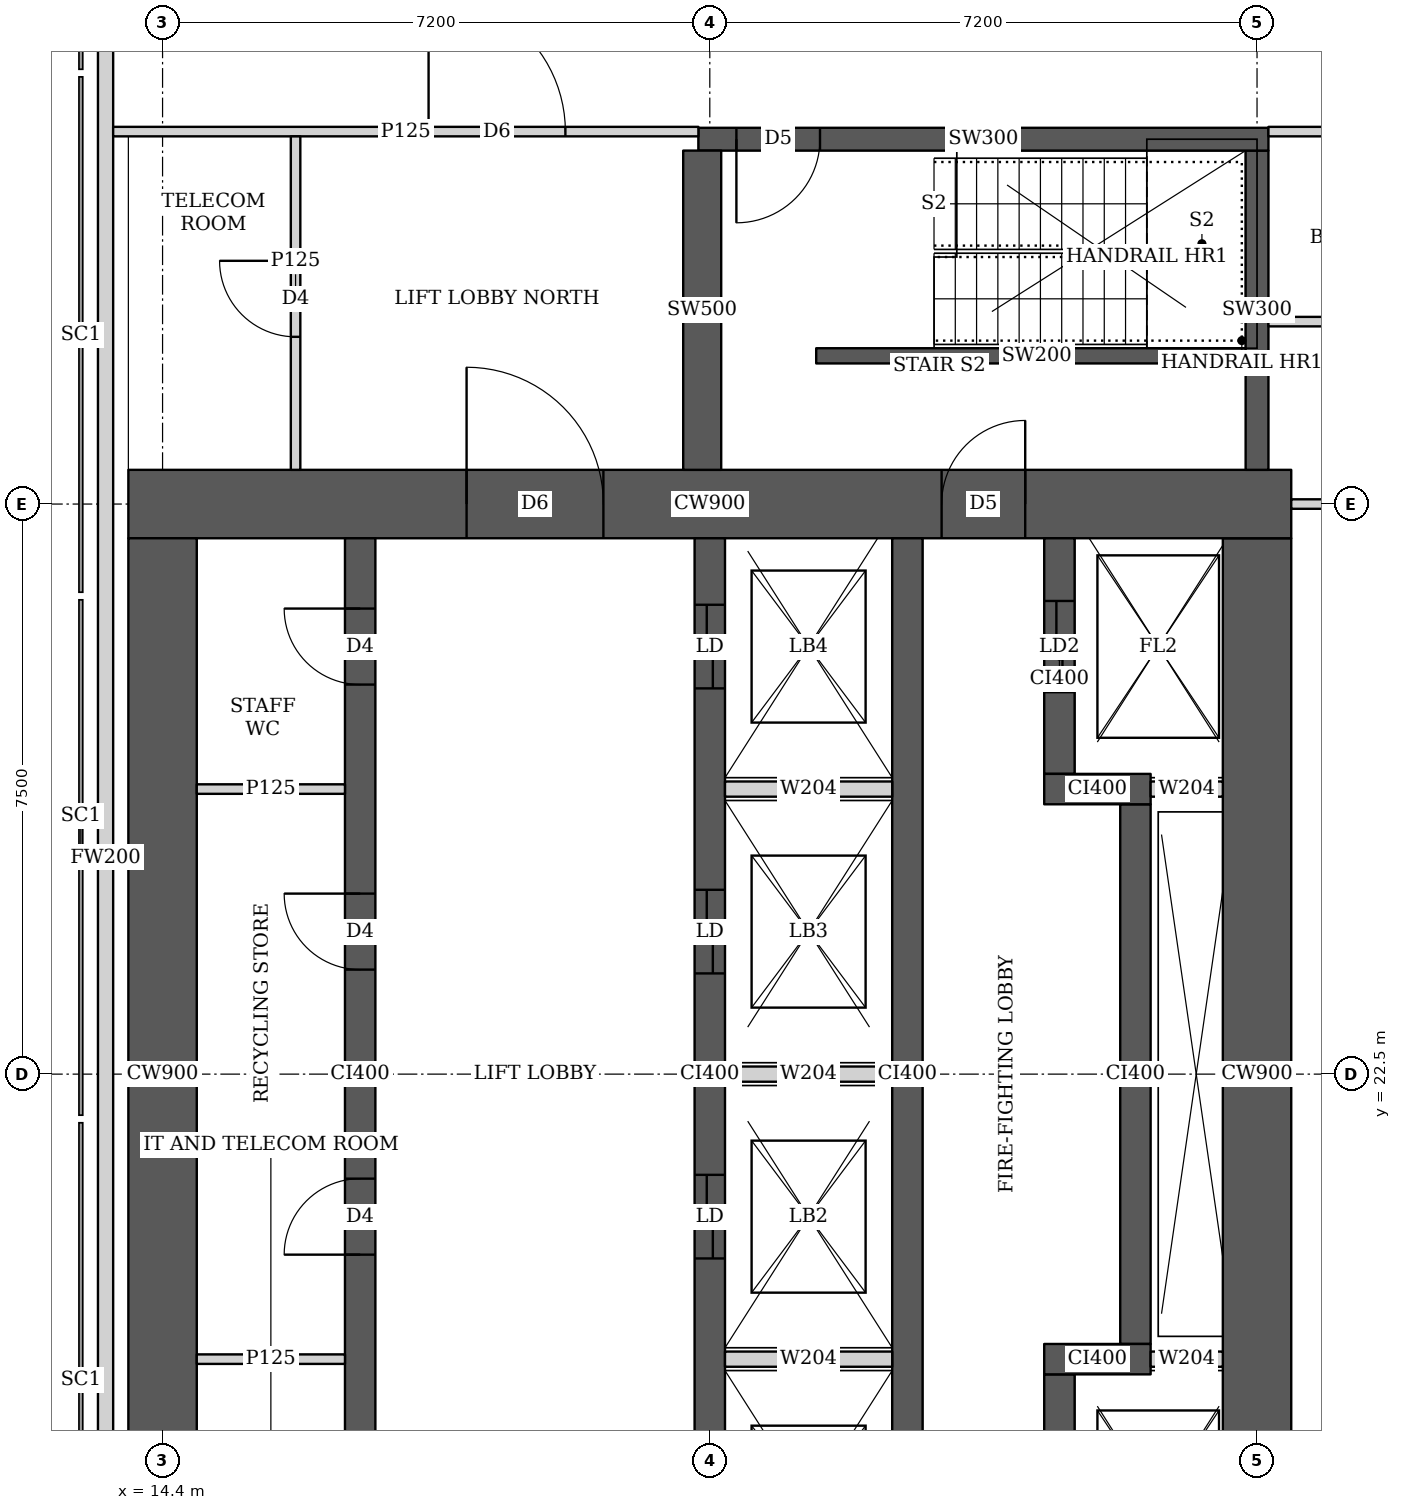
"""IFC4 building model, lengths in metres.
Left out: names, types, materials, properties, quantities, classifications, styles, units other than length and angle.
Written with IfcOpenShell. Run it as: python <this file> out.ifc"""

import sys

from ifc_helpers import new_model, si_unit, direction, frame, frame_2d, origin, place, context, subcontext, project, spatial, rectangle, extrude, element, fill, save


model = new_model("IFC4")
c1 = context("Model", 3, precision=1e-05, world=origin(), true_north=direction((0.0, 1.0)))
c2 = subcontext(c1, "Body", "Model", "MODEL_VIEW")
j1 = project(units=[si_unit("LENGTHUNIT", "METRE"), si_unit("PLANEANGLEUNIT", "RADIAN")], contexts=[c1])
p1 = place(None, origin())
s1 = spatial("IfcSite", under=j1, at=p1, CompositionType="ELEMENT")
p2 = place(p1, origin())
s2 = spatial("IfcBuilding", under=s1, at=p2, CompositionType="ELEMENT")
p3 = place(p2, frame((0.0, 0.0, 292.85)))
s3 = spatial("IfcBuildingStorey", under=s2, at=p3, CompositionType="ELEMENT", Elevation=292.85)
p4 = place(p3, frame((13.95, 30.0, 0.0), z_axis=(0.0, 0.0, 1.0), x_axis=(1.0, 0.0, 0.0)))
e1 = element("IfcWall", 1, at=p4, inside=s3, PredefinedType="SHEAR", context=c2, shape_type="SweptSolid", body=[
    extrude(rectangle(XDim=15.3, YDim=0.9, at=frame_2d((7.65, 0.0))), origin(), (0.0, 0.0, 1.0), 3.75),
])
p5 = place(p4, frame((4.45, 0.0, 0.0)))
e2 = element("IfcOpeningElement", 2, at=p5, cuts=e1, PredefinedType="OPENING", context=c2, shape_type="SweptSolid", body=[
    extrude(rectangle(XDim=1.8, YDim=2.1, at=frame_2d((0.9, 1.05))), frame((0.0, 0.46, 0.0), z_axis=(0.0, -1.0, 0.0), x_axis=(1.0, 0.0, 0.0)), (0.0, 0.0, 1.0), 0.92),
])
p6 = place(p4, frame((10.7, 0.0, 0.0)))
e3 = element("IfcOpeningElement", 3, at=p6, cuts=e1, PredefinedType="OPENING", context=c2, shape_type="SweptSolid", body=[
    extrude(rectangle(XDim=1.1, YDim=2.1, at=frame_2d((0.55, 1.05))), frame((0.0, 0.46, 0.0), z_axis=(0.0, -1.0, 0.0), x_axis=(1.0, 0.0, 0.0)), (0.0, 0.0, 1.0), 0.92),
])
for number, where, z_axis, x_axis in (
    (4, (14.4, 15.45, 0.0), (0.0, 0.0, 1.0), (0.0, 1.0, 0.0)),
    (5, (28.8, 15.45, 0.0), (0.0, 0.0, 1.0), (0.0, 1.0, 0.0)),
):
    element("IfcWall", number, at=place(p3, frame(where, z_axis=z_axis, x_axis=x_axis)), inside=s3, PredefinedType="SHEAR", context=c2, shape_type="SweptSolid", body=[
        extrude(rectangle(XDim=14.1, YDim=0.9, at=frame_2d((7.05, 0.0))), origin(), (0.0, 0.0, 1.0), 3.75),
    ])
p7 = place(p3, frame((17.0, 15.45, 0.0), z_axis=(0.0, 0.0, 1.0), x_axis=(0.0, 1.0, 0.0)))
e6 = element("IfcWall", 6, at=p7, inside=s3, PredefinedType="SHEAR", context=c2, shape_type="SweptSolid", body=[
    extrude(rectangle(XDim=14.1, YDim=0.4, at=frame_2d((7.05, 0.0))), origin(), (0.0, 0.0, 1.0), 3.75),
])
p8 = place(p7, frame((1.05, 0.0, 0.0)))
e7 = element("IfcOpeningElement", 7, at=p8, cuts=e6, PredefinedType="OPENING", context=c2, shape_type="SweptSolid", body=[
    extrude(rectangle(XDim=1.0, YDim=2.1, at=frame_2d((0.5, 1.05))), frame((0.0, 0.21, 0.0), z_axis=(0.0, -1.0, 0.0), x_axis=(1.0, 0.0, 0.0)), (0.0, 0.0, 1.0), 0.42),
])
p9 = place(p7, frame((4.675, 0.0, 0.0)))
e8 = element("IfcOpeningElement", 8, at=p9, cuts=e6, PredefinedType="OPENING", context=c2, shape_type="SweptSolid", body=[
    extrude(rectangle(XDim=1.0, YDim=2.1, at=frame_2d((0.5, 1.05))), frame((0.0, 0.21, 0.0), z_axis=(0.0, -1.0, 0.0), x_axis=(1.0, 0.0, 0.0)), (0.0, 0.0, 1.0), 0.42),
])
p10 = place(p7, frame((8.425, 0.0, 0.0)))
e9 = element("IfcOpeningElement", 9, at=p10, cuts=e6, PredefinedType="OPENING", context=c2, shape_type="SweptSolid", body=[
    extrude(rectangle(XDim=1.0, YDim=2.1, at=frame_2d((0.5, 1.05))), frame((0.0, 0.21, 0.0), z_axis=(0.0, -1.0, 0.0), x_axis=(1.0, 0.0, 0.0)), (0.0, 0.0, 1.0), 0.42),
])
p11 = place(p7, frame((12.175, 0.0, 0.0)))
e10 = element("IfcOpeningElement", 10, at=p11, cuts=e6, PredefinedType="OPENING", context=c2, shape_type="SweptSolid", body=[
    extrude(rectangle(XDim=1.0, YDim=2.1, at=frame_2d((0.5, 1.05))), frame((0.0, 0.21, 0.0), z_axis=(0.0, -1.0, 0.0), x_axis=(1.0, 0.0, 0.0)), (0.0, 0.0, 1.0), 0.42),
])
p12 = place(p3, frame((21.6, 15.45, 0.0), z_axis=(0.0, 0.0, 1.0), x_axis=(0.0, 1.0, 0.0)))
e11 = element("IfcWall", 11, at=p12, inside=s3, PredefinedType="SHEAR", context=c2, shape_type="SweptSolid", body=[
    extrude(rectangle(XDim=14.1, YDim=0.4, at=frame_2d((7.05, 0.0))), origin(), (0.0, 0.0, 1.0), 3.75),
])
p13 = place(p12, frame((0.875, 0.0, 0.0)))
e12 = element("IfcOpeningElement", 12, at=p13, cuts=e11, PredefinedType="OPENING", context=c2, shape_type="SweptSolid", body=[
    extrude(rectangle(XDim=1.1, YDim=2.1, at=frame_2d((0.55, 1.05))), frame((0.0, 0.21, 0.0), z_axis=(0.0, -1.0, 0.0), x_axis=(1.0, 0.0, 0.0)), (0.0, 0.0, 1.0), 0.42),
])
p14 = place(p12, frame((4.625, 0.0, 0.0)))
e13 = element("IfcOpeningElement", 13, at=p14, cuts=e11, PredefinedType="OPENING", context=c2, shape_type="SweptSolid", body=[
    extrude(rectangle(XDim=1.1, YDim=2.1, at=frame_2d((0.55, 1.05))), frame((0.0, 0.21, 0.0), z_axis=(0.0, -1.0, 0.0), x_axis=(1.0, 0.0, 0.0)), (0.0, 0.0, 1.0), 0.42),
])
p15 = place(p12, frame((8.375, 0.0, 0.0)))
e14 = element("IfcOpeningElement", 14, at=p15, cuts=e11, PredefinedType="OPENING", context=c2, shape_type="SweptSolid", body=[
    extrude(rectangle(XDim=1.1, YDim=2.1, at=frame_2d((0.55, 1.05))), frame((0.0, 0.21, 0.0), z_axis=(0.0, -1.0, 0.0), x_axis=(1.0, 0.0, 0.0)), (0.0, 0.0, 1.0), 0.42),
])
p16 = place(p12, frame((12.125, 0.0, 0.0)))
e15 = element("IfcOpeningElement", 15, at=p16, cuts=e11, PredefinedType="OPENING", context=c2, shape_type="SweptSolid", body=[
    extrude(rectangle(XDim=1.1, YDim=2.1, at=frame_2d((0.55, 1.05))), frame((0.0, 0.21, 0.0), z_axis=(0.0, -1.0, 0.0), x_axis=(1.0, 0.0, 0.0)), (0.0, 0.0, 1.0), 0.42),
])
p17 = place(p3, frame((24.2, 15.45, 0.0), z_axis=(0.0, 0.0, 1.0), x_axis=(0.0, 1.0, 0.0)))
e16 = element("IfcWall", 16, at=p17, inside=s3, PredefinedType="SHEAR", context=c2, shape_type="SweptSolid", body=[
    extrude(rectangle(XDim=14.1, YDim=0.4, at=frame_2d((7.05, 0.0))), origin(), (0.0, 0.0, 1.0), 3.75),
])
p18 = place(p3, frame((26.2, 15.45, 0.0), z_axis=(0.0, 0.0, 1.0), x_axis=(0.0, 1.0, 0.0)))
e17 = element("IfcWall", 17, at=p18, inside=s3, PredefinedType="SHEAR", context=c2, shape_type="SweptSolid", body=[
    extrude(rectangle(XDim=3.1, YDim=0.4, at=frame_2d((1.55, 0.0))), origin(), (0.0, 0.0, 1.0), 3.75),
])
p19 = place(p18, frame((0.825, 0.0, 0.0)))
e18 = element("IfcOpeningElement", 18, at=p19, cuts=e17, PredefinedType="OPENING", context=c2, shape_type="SweptSolid", body=[
    extrude(rectangle(XDim=1.2, YDim=2.1, at=frame_2d((0.6, 1.05))), frame((0.0, 0.21, 0.0), z_axis=(0.0, -1.0, 0.0), x_axis=(1.0, 0.0, 0.0)), (0.0, 0.0, 1.0), 0.42),
])
p20 = place(p3, frame((26.0, 18.75, 0.0), z_axis=(0.0, 0.0, 1.0), x_axis=(1.0, 0.0, 0.0)))
e19 = element("IfcWall", 19, at=p20, inside=s3, PredefinedType="SHEAR", context=c2, shape_type="SweptSolid", body=[
    extrude(rectangle(XDim=1.4, YDim=0.4, at=frame_2d((0.7, 0.0))), origin(), (0.0, 0.0, 1.0), 3.75),
])
p21 = place(p3, frame((27.2, 18.95, 0.0), z_axis=(0.0, 0.0, 1.0), x_axis=(0.0, 1.0, 0.0)))
e20 = element("IfcWall", 20, at=p21, inside=s3, PredefinedType="SHEAR", context=c2, shape_type="SweptSolid", body=[
    extrude(rectangle(XDim=7.1, YDim=0.4, at=frame_2d((3.55, 0.0))), origin(), (0.0, 0.0, 1.0), 3.75),
])
p22 = place(p3, frame((26.0, 26.25, 0.0), z_axis=(0.0, 0.0, 1.0), x_axis=(1.0, 0.0, 0.0)))
e21 = element("IfcWall", 21, at=p22, inside=s3, PredefinedType="SHEAR", context=c2, shape_type="SweptSolid", body=[
    extrude(rectangle(XDim=1.4, YDim=0.4, at=frame_2d((0.7, 0.0))), origin(), (0.0, 0.0, 1.0), 3.75),
])
p23 = place(p3, frame((26.2, 26.45, 0.0), z_axis=(0.0, 0.0, 1.0), x_axis=(0.0, 1.0, 0.0)))
e22 = element("IfcWall", 22, at=p23, inside=s3, PredefinedType="SHEAR", context=c2, shape_type="SweptSolid", body=[
    extrude(rectangle(XDim=3.1, YDim=0.4, at=frame_2d((1.55, 0.0))), origin(), (0.0, 0.0, 1.0), 3.75),
])
p24 = place(p23, frame((1.075, 0.0, 0.0)))
e23 = element("IfcOpeningElement", 23, at=p24, cuts=e22, PredefinedType="OPENING", context=c2, shape_type="SweptSolid", body=[
    extrude(rectangle(XDim=1.2, YDim=2.1, at=frame_2d((0.6, 1.05))), frame((0.0, 0.21, 0.0), z_axis=(0.0, -1.0, 0.0), x_axis=(1.0, 0.0, 0.0)), (0.0, 0.0, 1.0), 0.42),
])
p25 = place(p3, frame((21.45, 34.8, 0.0), z_axis=(0.0, 0.0, 1.0), x_axis=(1.0, 0.0, 0.0)))
e24 = element("IfcWall", 24, at=p25, inside=s3, PredefinedType="SHEAR", context=c2, shape_type="SweptSolid", body=[
    extrude(rectangle(XDim=7.5, YDim=0.3, at=frame_2d((3.75, 0.0))), origin(), (0.0, 0.0, 1.0), 3.75),
])
p26 = place(p25, frame((0.5, 0.0, 0.0)))
e25 = element("IfcOpeningElement", 25, at=p26, cuts=e24, PredefinedType="OPENING", context=c2, shape_type="SweptSolid", body=[
    extrude(rectangle(XDim=1.1, YDim=2.1, at=frame_2d((0.55, 1.05))), frame((0.0, 0.16, 0.0), z_axis=(0.0, -1.0, 0.0), x_axis=(1.0, 0.0, 0.0)), (0.0, 0.0, 1.0), 0.32),
])
p27 = place(p3, frame((21.5, 30.45, 0.0), z_axis=(0.0, 0.0, 1.0), x_axis=(0.0, 1.0, 0.0)))
e26 = element("IfcWall", 26, at=p27, inside=s3, PredefinedType="SHEAR", context=c2, shape_type="SweptSolid", body=[
    extrude(rectangle(XDim=4.2, YDim=0.5, at=frame_2d((2.1, 0.0))), origin(), (0.0, 0.0, 1.0), 3.75),
])
p28 = place(p3, frame((28.8, 30.45, 0.0), z_axis=(0.0, 0.0, 1.0), x_axis=(0.0, 1.0, 0.0)))
e27 = element("IfcWall", 27, at=p28, inside=s3, PredefinedType="SHEAR", context=c2, shape_type="SweptSolid", body=[
    extrude(rectangle(XDim=4.2, YDim=0.3, at=frame_2d((2.1, 0.0))), origin(), (0.0, 0.0, 1.0), 3.75),
])
p29 = place(p3, frame((13.65, 43.037, 0.0), z_axis=(0.0, 0.0, 1.0), x_axis=(0.0, -1.0, 0.0)))
e28 = element("IfcWall", 28, at=p29, inside=s3, PredefinedType="SOLIDWALL", context=c2, shape_type="SweptSolid", body=[
    extrude(rectangle(XDim=35.374, YDim=0.2, at=frame_2d((17.687, 0.0))), origin(), (0.0, 0.0, 1.0), 3.4),
])
p30 = place(p3, frame((13.75, 34.9, 0.0), z_axis=(0.0, 0.0, 1.0), x_axis=(1.0, 0.0, 0.0)))
e29 = element("IfcWall", 29, at=p30, inside=s3, PredefinedType="PARTITIONING", context=c2, shape_type="SweptSolid", body=[
    extrude(rectangle(XDim=7.7, YDim=0.125, at=frame_2d((3.85, 0.0))), origin(), (0.0, 0.0, 1.0), 3.4),
])
p31 = place(p30, frame((4.15, 0.0, 0.0)))
e30 = element("IfcOpeningElement", 30, at=p31, cuts=e29, PredefinedType="OPENING", context=c2, shape_type="SweptSolid", body=[
    extrude(rectangle(XDim=1.8, YDim=2.1, at=frame_2d((0.9, 1.05))), frame((0.0, 0.073, 0.0), z_axis=(0.0, -1.0, 0.0), x_axis=(1.0, 0.0, 0.0)), (0.0, 0.0, 1.0), 0.145),
])
p32 = place(p3, frame((16.15, 30.45, 0.0), z_axis=(0.0, 0.0, 1.0), x_axis=(0.0, 1.0, 0.0)))
e31 = element("IfcWall", 31, at=p32, inside=s3, PredefinedType="PARTITIONING", context=c2, shape_type="SweptSolid", body=[
    extrude(rectangle(XDim=4.387, YDim=0.125, at=frame_2d((2.193, 0.0))), origin(), (0.0, 0.0, 1.0), 3.4),
])
p33 = place(p32, frame((1.75, 0.0, 0.0)))
e32 = element("IfcOpeningElement", 32, at=p33, cuts=e31, PredefinedType="OPENING", context=c2, shape_type="SweptSolid", body=[
    extrude(rectangle(XDim=1.0, YDim=2.1, at=frame_2d((0.5, 1.05))), frame((0.0, 0.073, 0.0), z_axis=(0.0, -1.0, 0.0), x_axis=(1.0, 0.0, 0.0)), (0.0, 0.0, 1.0), 0.145),
])
p34 = place(p3, frame((28.95, 34.9, 0.0), z_axis=(0.0, 0.0, 1.0), x_axis=(1.0, 0.0, 0.0)))
e33 = element("IfcWall", 33, at=p34, inside=s3, PredefinedType="PARTITIONING", context=c2, shape_type="SweptSolid", body=[
    extrude(rectangle(XDim=4.588, YDim=0.125, at=frame_2d((2.294, 0.0))), origin(), (0.0, 0.0, 1.0), 3.4),
])
p35 = place(p3, frame((29.25, 30.0, 0.0), z_axis=(0.0, 0.0, 1.0), x_axis=(1.0, 0.0, 0.0)))
e34 = element("IfcWall", 34, at=p35, inside=s3, PredefinedType="PARTITIONING", context=c2, shape_type="SweptSolid", body=[
    extrude(rectangle(XDim=3.049, YDim=0.125, at=frame_2d((1.524, 0.0))), origin(), (0.0, 0.0, 1.0), 3.4),
])
p36 = place(p3, frame((28.95, 32.4, 0.0), z_axis=(0.0, 0.0, 1.0), x_axis=(1.0, 0.0, 0.0)))
e35 = element("IfcWall", 35, at=p36, inside=s3, PredefinedType="PARTITIONING", context=c2, shape_type="SweptSolid", body=[
    extrude(rectangle(XDim=4.976, YDim=0.125, at=frame_2d((2.488, 0.0))), origin(), (0.0, 0.0, 1.0), 3.4),
])
for number, where, z_axis, x_axis in (
    (36, (14.85, 18.75, 0.0), (0.0, 0.0, 1.0), (1.0, 0.0, 0.0)),
    (37, (14.85, 26.25, 0.0), (0.0, 0.0, 1.0), (1.0, 0.0, 0.0)),
):
    element("IfcWall", number, at=place(p3, frame(where, z_axis=z_axis, x_axis=x_axis)), inside=s3, PredefinedType="PARTITIONING", context=c2, shape_type="SweptSolid", body=[
        extrude(rectangle(XDim=1.95, YDim=0.125, at=frame_2d((0.975, 0.0))), origin(), (0.0, 0.0, 1.0), 3.4),
    ])
p37 = place(p3, frame((23.0, 31.95, 0.0), z_axis=(0.0, 0.0, 1.0), x_axis=(1.0, 0.0, 0.0)))
e38 = element("IfcWall", 38, at=p37, inside=s3, PredefinedType="SHEAR", context=c2, shape_type="SweptSolid", body=[
    extrude(rectangle(XDim=5.8, YDim=0.2, at=frame_2d((2.9, 0.0))), origin(), (0.0, 0.0, 1.0), 3.75),
])
for number, where, z_axis, x_axis in (
    (39, (21.8, 18.75, 0.0), (0.0, 0.0, 1.0), (1.0, 0.0, 0.0)),
    (40, (21.8, 22.5, 0.0), (0.0, 0.0, 1.0), (1.0, 0.0, 0.0)),
    (41, (21.8, 26.25, 0.0), (0.0, 0.0, 1.0), (1.0, 0.0, 0.0)),
):
    element("IfcWall", number, at=place(p3, frame(where, z_axis=z_axis, x_axis=x_axis)), inside=s3, PredefinedType="SOLIDWALL", context=c2, shape_type="SweptSolid", body=[
        extrude(rectangle(XDim=2.2, YDim=0.2, at=frame_2d((1.1, 0.0))), origin(), (0.0, 0.0, 1.0), 3.4),
    ])
for number, where, z_axis, x_axis in (
    (42, (27.4, 18.75, 0.0), (0.0, 0.0, 1.0), (1.0, 0.0, 0.0)),
    (43, (27.4, 26.25, 0.0), (0.0, 0.0, 1.0), (1.0, 0.0, 0.0)),
):
    element("IfcWall", number, at=place(p3, frame(where, z_axis=z_axis, x_axis=x_axis)), inside=s3, PredefinedType="SOLIDWALL", context=c2, shape_type="SweptSolid", body=[
        extrude(rectangle(XDim=0.95, YDim=0.2, at=frame_2d((0.475, 0.0))), origin(), (0.0, 0.0, 1.0), 3.4),
    ])
p38 = place(p33, origin())
e44 = element("IfcDoor", 44, at=p38, inside=s3, OperationType="SINGLE_SWING_RIGHT", PredefinedType="DOOR", context=c2, shape_type="SweptSolid", body=[
    extrude(rectangle(XDim=1.0, YDim=2.1, at=frame_2d((0.5, 1.05))), frame((0.0, 0.025, 0.0), z_axis=(0.0, -1.0, 0.0), x_axis=(1.0, 0.0, 0.0)), (0.0, 0.0, 1.0), 0.05),
])
fill(e32, e44)
p39 = place(p31, origin())
e45 = element("IfcDoor", 45, at=p39, inside=s3, OperationType="DOUBLE_DOOR_SINGLE_SWING", PredefinedType="DOOR", context=c2, shape_type="SweptSolid", body=[
    extrude(rectangle(XDim=1.8, YDim=2.1, at=frame_2d((0.9, 1.05))), frame((0.0, 0.025, 0.0), z_axis=(0.0, -1.0, 0.0), x_axis=(1.0, 0.0, 0.0)), (0.0, 0.0, 1.0), 0.05),
])
fill(e30, e45)
p40 = place(p9, origin())
e46 = element("IfcDoor", 46, at=p40, inside=s3, OperationType="SINGLE_SWING_LEFT", PredefinedType="DOOR", context=c2, shape_type="SweptSolid", body=[
    extrude(rectangle(XDim=1.0, YDim=2.1, at=frame_2d((0.5, 1.05))), frame((0.0, 0.025, 0.0), z_axis=(0.0, -1.0, 0.0), x_axis=(1.0, 0.0, 0.0)), (0.0, 0.0, 1.0), 0.05),
])
fill(e8, e46)
p41 = place(p10, origin())
e47 = element("IfcDoor", 47, at=p41, inside=s3, OperationType="SINGLE_SWING_RIGHT", PredefinedType="DOOR", context=c2, shape_type="SweptSolid", body=[
    extrude(rectangle(XDim=1.0, YDim=2.1, at=frame_2d((0.5, 1.05))), frame((0.0, 0.025, 0.0), z_axis=(0.0, -1.0, 0.0), x_axis=(1.0, 0.0, 0.0)), (0.0, 0.0, 1.0), 0.05),
])
fill(e9, e47)
p42 = place(p11, origin())
e48 = element("IfcDoor", 48, at=p42, inside=s3, OperationType="SINGLE_SWING_RIGHT", PredefinedType="DOOR", context=c2, shape_type="SweptSolid", body=[
    extrude(rectangle(XDim=1.0, YDim=2.1, at=frame_2d((0.5, 1.05))), frame((0.0, 0.025, 0.0), z_axis=(0.0, -1.0, 0.0), x_axis=(1.0, 0.0, 0.0)), (0.0, 0.0, 1.0), 0.05),
])
fill(e10, e48)
p43 = place(p5, origin())
e49 = element("IfcDoor", 49, at=p43, inside=s3, OperationType="DOUBLE_DOOR_SINGLE_SWING", PredefinedType="DOOR", context=c2, shape_type="SweptSolid", body=[
    extrude(rectangle(XDim=1.8, YDim=2.1, at=frame_2d((0.9, 1.05))), frame((0.0, 0.025, 0.0), z_axis=(0.0, -1.0, 0.0), x_axis=(1.0, 0.0, 0.0)), (0.0, 0.0, 1.0), 0.05),
])
fill(e2, e49)
p44 = place(p6, origin())
e50 = element("IfcDoor", 50, at=p44, inside=s3, OperationType="SINGLE_SWING_RIGHT", PredefinedType="DOOR", context=c2, shape_type="SweptSolid", body=[
    extrude(rectangle(XDim=1.1, YDim=2.1, at=frame_2d((0.55, 1.05))), frame((0.0, 0.025, 0.0), z_axis=(0.0, -1.0, 0.0), x_axis=(1.0, 0.0, 0.0)), (0.0, 0.0, 1.0), 0.05),
])
fill(e3, e50)
p45 = place(p24, origin())
e51 = element("IfcDoor", 51, at=p45, inside=s3, OperationType="DOUBLE_DOOR_SLIDING", PredefinedType="DOOR", context=c2, shape_type="SweptSolid", body=[
    extrude(rectangle(XDim=1.2, YDim=2.1, at=frame_2d((0.6, 1.05))), frame((0.0, 0.025, 0.0), z_axis=(0.0, -1.0, 0.0), x_axis=(1.0, 0.0, 0.0)), (0.0, 0.0, 1.0), 0.05),
])
fill(e23, e51)
p46 = place(p14, origin())
e52 = element("IfcDoor", 52, at=p46, inside=s3, OperationType="DOUBLE_DOOR_SLIDING", PredefinedType="DOOR", context=c2, shape_type="SweptSolid", body=[
    extrude(rectangle(XDim=1.1, YDim=2.1, at=frame_2d((0.55, 1.05))), frame((0.0, 0.025, 0.0), z_axis=(0.0, -1.0, 0.0), x_axis=(1.0, 0.0, 0.0)), (0.0, 0.0, 1.0), 0.05),
])
fill(e13, e52)
p47 = place(p15, origin())
e53 = element("IfcDoor", 53, at=p47, inside=s3, OperationType="DOUBLE_DOOR_SLIDING", PredefinedType="DOOR", context=c2, shape_type="SweptSolid", body=[
    extrude(rectangle(XDim=1.1, YDim=2.1, at=frame_2d((0.55, 1.05))), frame((0.0, 0.025, 0.0), z_axis=(0.0, -1.0, 0.0), x_axis=(1.0, 0.0, 0.0)), (0.0, 0.0, 1.0), 0.05),
])
fill(e14, e53)
p48 = place(p16, origin())
e54 = element("IfcDoor", 54, at=p48, inside=s3, OperationType="DOUBLE_DOOR_SLIDING", PredefinedType="DOOR", context=c2, shape_type="SweptSolid", body=[
    extrude(rectangle(XDim=1.1, YDim=2.1, at=frame_2d((0.55, 1.05))), frame((0.0, 0.025, 0.0), z_axis=(0.0, -1.0, 0.0), x_axis=(1.0, 0.0, 0.0)), (0.0, 0.0, 1.0), 0.05),
])
fill(e15, e54)
p49 = place(p26, origin())
e55 = element("IfcDoor", 55, at=p49, inside=s3, OperationType="SINGLE_SWING_RIGHT", PredefinedType="DOOR", context=c2, shape_type="SweptSolid", body=[
    extrude(rectangle(XDim=1.1, YDim=2.1, at=frame_2d((0.55, 1.05))), frame((0.0, 0.025, 0.0), z_axis=(0.0, -1.0, 0.0), x_axis=(1.0, 0.0, 0.0)), (0.0, 0.0, 1.0), 0.05),
])
fill(e25, e55)
save(model, sys.argv[1])
